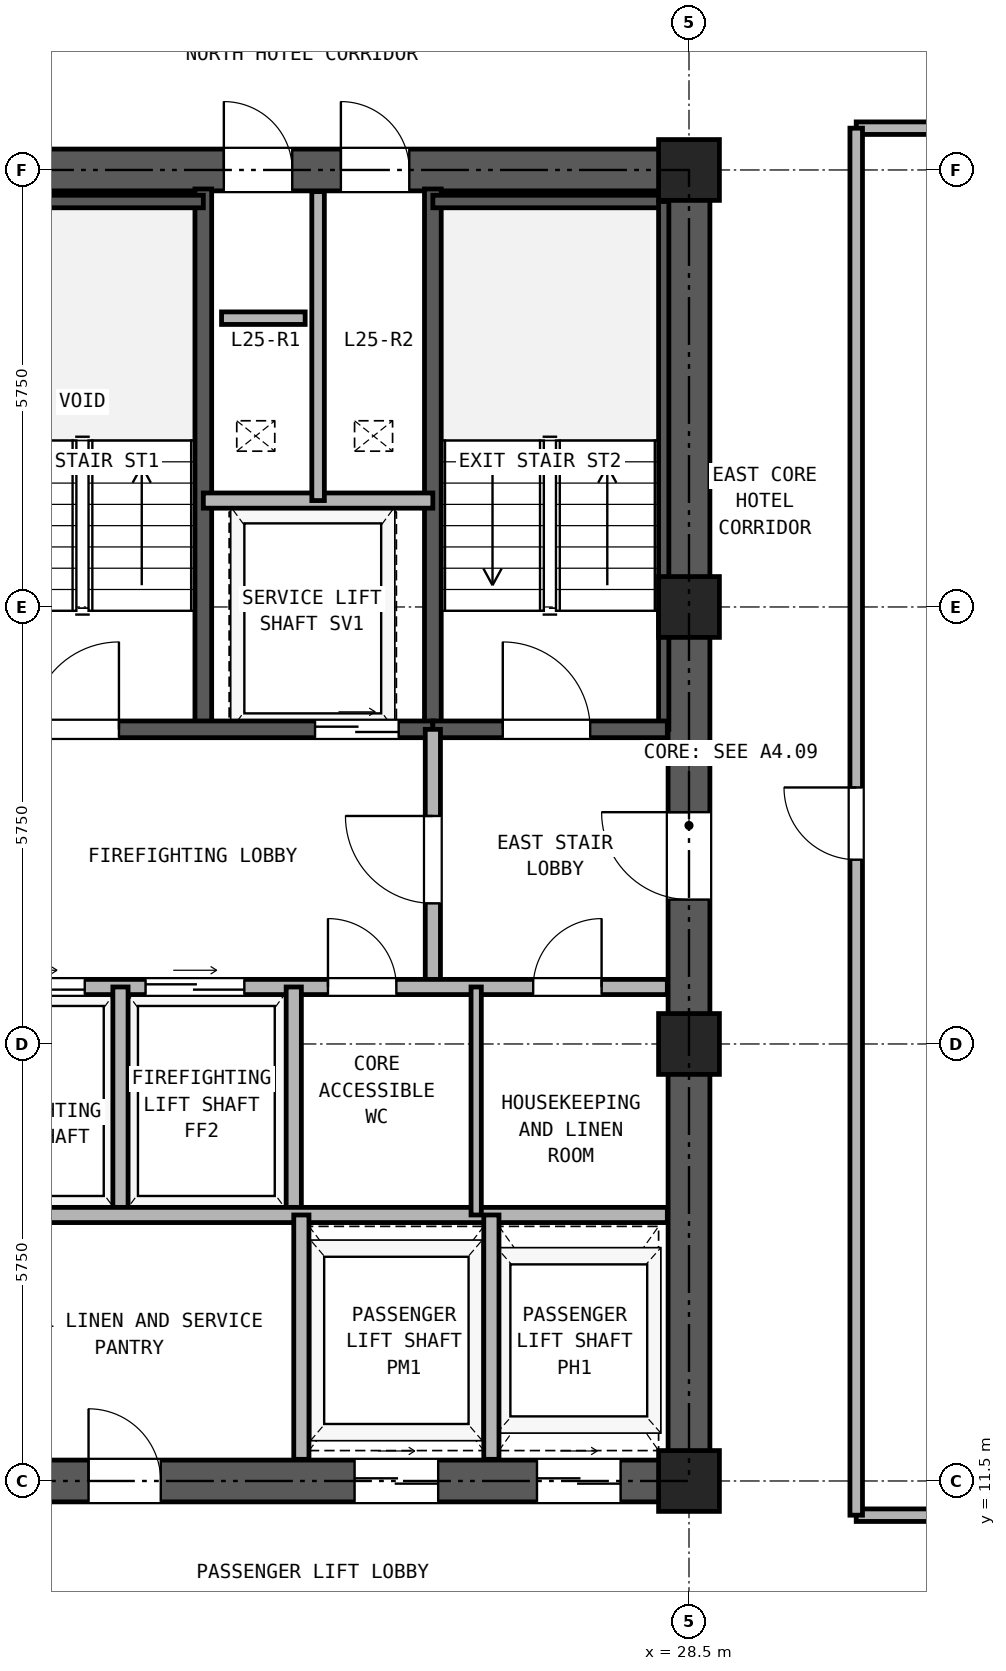
"""IFC4 building model, lengths in metres.
Left out: names, types, materials, properties, quantities, classifications, styles, units other than length and angle.
Written with IfcOpenShell. Run it as: python <this file> out.ifc"""

import sys

from ifc_helpers import new_model, si_unit, direction, frame, frame_2d, origin, origin_2d, place, context, subcontext, project, spatial, rectangle, hollow_rectangle, extrude, source, transform, mapped, element, fill, save


model = new_model("IFC4")
c1 = context("Model", 3, precision=1e-05, world=origin(), true_north=direction((0.0, 1.0)))
c2 = subcontext(c1, "Body", "Model", "MODEL_VIEW")
j1 = project(units=[si_unit("LENGTHUNIT", "METRE"), si_unit("PLANEANGLEUNIT", "RADIAN")], contexts=[c1])
p1 = place(None, origin())
s1 = spatial("IfcSite", under=j1, at=p1, CompositionType="ELEMENT")
p2 = place(p1, origin())
s2 = spatial("IfcBuilding", under=s1, at=p2, CompositionType="ELEMENT")
p3 = place(p2, frame((0.0, 0.0, 95.9)))
s3 = spatial("IfcBuildingStorey", under=s2, at=p3, CompositionType="ELEMENT", Elevation=95.9)
m1 = source(origin(), c2, "Body", "SweptSolid", [
    extrude(hollow_rectangle(XDim=0.8, YDim=0.8, WallThickness=0.045, at=origin_2d()), origin(), (0.0, 0.0, 1.0), 2.95),
])
for number, where, z_axis, x_axis in (
    (1, (28.5, 11.5, 0.0), (0.0, 0.0, 1.0), (1.0, 0.0, 0.0)),
    (2, (28.5, 17.25, 0.0), (0.0, 0.0, 1.0), (1.0, 0.0, 0.0)),
    (3, (28.5, 23.0, 0.0), (0.0, 0.0, 1.0), (1.0, 0.0, 0.0)),
    (4, (28.5, 28.75, 0.0), (0.0, 0.0, 1.0), (1.0, 0.0, 0.0)),
):
    element("IfcColumn", number, at=place(p3, frame(where, z_axis=z_axis, x_axis=x_axis)), inside=s3, PredefinedType="COLUMN", context=c2, shape_type="MappedRepresentation", body=[
        mapped(m1, transform((0.0, 0.0, 0.0), x_axis=(1.0, 0.0, 0.0), y_axis=(0.0, 1.0, 0.0), z_axis=(0.0, 0.0, 1.0), scale=1.0)),
    ])
p4 = place(p3, frame((18.225, 11.5, 0.0), z_axis=(0.0, 0.0, 1.0), x_axis=(1.0, 0.0, 0.0)))
e5 = element("IfcWall", 5, at=p4, inside=s3, PredefinedType="SHEAR", context=c2, shape_type="SweptSolid", body=[
    extrude(rectangle(XDim=10.55, YDim=0.55, at=frame_2d((5.275, 0.0))), origin(), (0.0, 0.0, 1.0), 2.95),
])
p5 = place(p4, frame((2.375, 0.0, 0.0)))
e6 = element("IfcOpeningElement", 6, at=p5, cuts=e5, PredefinedType="OPENING", context=c2, shape_type="SweptSolid", body=[
    extrude(rectangle(XDim=0.95, YDim=2.15, at=frame_2d((0.475, 1.075))), frame((0.0, 0.285, 0.0), z_axis=(0.0, -1.0, 0.0), x_axis=(1.0, 0.0, 0.0)), (0.0, 0.0, 1.0), 0.57),
])
p6 = place(p4, frame((5.875, 0.0, 0.0)))
e7 = element("IfcOpeningElement", 7, at=p6, cuts=e5, PredefinedType="OPENING", context=c2, shape_type="SweptSolid", body=[
    extrude(rectangle(XDim=1.1, YDim=2.25, at=frame_2d((0.55, 1.125))), frame((0.0, 0.285, 0.0), z_axis=(0.0, -1.0, 0.0), x_axis=(1.0, 0.0, 0.0)), (0.0, 0.0, 1.0), 0.57),
])
p7 = place(p4, frame((8.275, 0.0, 0.0)))
e8 = element("IfcOpeningElement", 8, at=p7, cuts=e5, PredefinedType="OPENING", context=c2, shape_type="SweptSolid", body=[
    extrude(rectangle(XDim=1.1, YDim=2.25, at=frame_2d((0.55, 1.125))), frame((0.0, 0.285, 0.0), z_axis=(0.0, -1.0, 0.0), x_axis=(1.0, 0.0, 0.0)), (0.0, 0.0, 1.0), 0.57),
])
p8 = place(p3, frame((18.225, 28.75, 0.0), z_axis=(0.0, 0.0, 1.0), x_axis=(1.0, 0.0, 0.0)))
e9 = element("IfcWall", 9, at=p8, inside=s3, PredefinedType="SHEAR", context=c2, shape_type="SweptSolid", body=[
    extrude(rectangle(XDim=10.55, YDim=0.55, at=frame_2d((5.275, 0.0))), origin(), (0.0, 0.0, 1.0), 2.95),
])
p9 = place(p8, frame((4.155, 0.0, 0.0)))
e10 = element("IfcOpeningElement", 10, at=p9, cuts=e9, PredefinedType="OPENING", context=c2, shape_type="SweptSolid", body=[
    extrude(rectangle(XDim=0.9, YDim=2.05, at=frame_2d((0.45, 1.025))), frame((0.0, 0.285, 0.0), z_axis=(0.0, -1.0, 0.0), x_axis=(1.0, 0.0, 0.0)), (0.0, 0.0, 1.0), 0.57),
])
p10 = place(p8, frame((5.695, 0.0, 0.0)))
e11 = element("IfcOpeningElement", 11, at=p10, cuts=e9, PredefinedType="OPENING", context=c2, shape_type="SweptSolid", body=[
    extrude(rectangle(XDim=0.9, YDim=2.05, at=frame_2d((0.45, 1.025))), frame((0.0, 0.285, 0.0), z_axis=(0.0, -1.0, 0.0), x_axis=(1.0, 0.0, 0.0)), (0.0, 0.0, 1.0), 0.57),
])
p11 = place(p3, frame((28.5, 11.775, 0.0), z_axis=(0.0, 0.0, 1.0), x_axis=(0.0, 1.0, 0.0)))
e12 = element("IfcWall", 12, at=p11, inside=s3, PredefinedType="SHEAR", context=c2, shape_type="SweptSolid", body=[
    extrude(rectangle(XDim=16.7, YDim=0.55, at=frame_2d((8.35, 0.0))), origin(), (0.0, 0.0, 1.0), 2.95),
])
p12 = place(p11, frame((7.375, 0.0, 0.0)))
e13 = element("IfcOpeningElement", 13, at=p12, cuts=e12, PredefinedType="OPENING", context=c2, shape_type="SweptSolid", body=[
    extrude(rectangle(XDim=1.15, YDim=2.2, at=frame_2d((0.575, 1.1))), frame((0.0, 0.285, 0.0), z_axis=(0.0, -1.0, 0.0), x_axis=(1.0, 0.0, 0.0)), (0.0, 0.0, 1.0), 0.57),
])
for number, where, z_axis, x_axis in (
    (14, (22.11, 21.39, 0.0), (0.0, 0.0, 1.0), (0.0, 1.0, 0.0)),
    (15, (25.13, 21.39, 0.0), (0.0, 0.0, 1.0), (0.0, 1.0, 0.0)),
):
    element("IfcWall", number, at=place(p3, frame(where, z_axis=z_axis, x_axis=x_axis)), inside=s3, PredefinedType="SOLIDWALL", context=c2, shape_type="SweptSolid", body=[
        extrude(rectangle(XDim=7.11, YDim=0.22, at=frame_2d((3.555, 0.0))), origin(), (0.0, 0.0, 1.0), 2.95),
    ])
p13 = place(p3, frame((18.785, 28.335, 0.0), z_axis=(0.0, 0.0, 1.0), x_axis=(1.0, 0.0, 0.0)))
e16 = element("IfcWall", 16, at=p13, inside=s3, PredefinedType="PARTITIONING", context=c2, shape_type="SweptSolid", body=[
    extrude(rectangle(XDim=3.325, YDim=0.165, at=frame_2d((1.663, 0.0))), origin(), (0.0, 0.0, 1.0), 2.95),
])
p14 = place(p3, frame((25.13, 28.335, 0.0), z_axis=(0.0, 0.0, 1.0), x_axis=(1.0, 0.0, 0.0)))
e17 = element("IfcWall", 17, at=p14, inside=s3, PredefinedType="PARTITIONING", context=c2, shape_type="SweptSolid", body=[
    extrude(rectangle(XDim=3.085, YDim=0.165, at=frame_2d((1.542, 0.0))), origin(), (0.0, 0.0, 1.0), 2.95),
])
p15 = place(p3, frame((28.167, 21.39, 0.0), z_axis=(0.0, 0.0, 1.0), x_axis=(0.0, 1.0, 0.0)))
e18 = element("IfcWall", 18, at=p15, inside=s3, PredefinedType="PARTITIONING", context=c2, shape_type="SweptSolid", body=[
    extrude(rectangle(XDim=6.945, YDim=0.135, at=frame_2d((3.473, 0.0))), origin(), (0.0, 0.0, 1.0), 2.95),
])
p16 = place(p3, frame((18.785, 21.39, 0.0), z_axis=(0.0, 0.0, 1.0), x_axis=(1.0, 0.0, 0.0)))
e19 = element("IfcWall", 19, at=p16, inside=s3, PredefinedType="SOLIDWALL", context=c2, shape_type="SweptSolid", body=[
    extrude(rectangle(XDim=6.345, YDim=0.22, at=frame_2d((3.172, 0.0))), origin(), (0.0, 0.0, 1.0), 2.95),
])
p17 = place(p16, frame((1.065, 0.0, 0.0)))
e20 = element("IfcOpeningElement", 20, at=p17, cuts=e19, PredefinedType="OPENING", context=c2, shape_type="SweptSolid", body=[
    extrude(rectangle(XDim=1.15, YDim=2.2, at=frame_2d((0.575, 1.1))), frame((0.0, 0.12, 0.0), z_axis=(0.0, -1.0, 0.0), x_axis=(1.0, 0.0, 0.0)), (0.0, 0.0, 1.0), 0.24),
])
p18 = place(p16, frame((4.795, 0.0, 0.0)))
e21 = element("IfcOpeningElement", 21, at=p18, cuts=e19, PredefinedType="OPENING", context=c2, shape_type="SweptSolid", body=[
    extrude(rectangle(XDim=1.1, YDim=2.25, at=frame_2d((0.55, 1.125))), frame((0.0, 0.12, 0.0), z_axis=(0.0, -1.0, 0.0), x_axis=(1.0, 0.0, 0.0)), (0.0, 0.0, 1.0), 0.24),
])
p19 = place(p3, frame((25.13, 21.39, 0.0), z_axis=(0.0, 0.0, 1.0), x_axis=(1.0, 0.0, 0.0)))
e22 = element("IfcWall", 22, at=p19, inside=s3, PredefinedType="SOLIDWALL", context=c2, shape_type="SweptSolid", body=[
    extrude(rectangle(XDim=3.085, YDim=0.22, at=frame_2d((1.542, 0.0))), origin(), (0.0, 0.0, 1.0), 2.95),
])
p20 = place(p19, frame((0.92, 0.0, 0.0)))
e23 = element("IfcOpeningElement", 23, at=p20, cuts=e22, PredefinedType="OPENING", context=c2, shape_type="SweptSolid", body=[
    extrude(rectangle(XDim=1.15, YDim=2.2, at=frame_2d((0.575, 1.1))), frame((0.0, 0.12, 0.0), z_axis=(0.0, -1.0, 0.0), x_axis=(1.0, 0.0, 0.0)), (0.0, 0.0, 1.0), 0.24),
])
p21 = place(p3, frame((22.11, 24.4, 0.0), z_axis=(0.0, 0.0, 1.0), x_axis=(1.0, 0.0, 0.0)))
e24 = element("IfcWall", 24, at=p21, inside=s3, PredefinedType="PARTITIONING", context=c2, shape_type="SweptSolid", body=[
    extrude(rectangle(XDim=3.02, YDim=0.2, at=frame_2d((1.51, 0.0))), origin(), (0.0, 0.0, 1.0), 2.95),
])
p22 = place(p3, frame((23.62, 24.4, 0.0), z_axis=(0.0, 0.0, 1.0), x_axis=(0.0, 1.0, 0.0)))
e25 = element("IfcWall", 25, at=p22, inside=s3, PredefinedType="PARTITIONING", context=c2, shape_type="SweptSolid", body=[
    extrude(rectangle(XDim=4.065, YDim=0.165, at=frame_2d((2.033, 0.0))), origin(), (0.0, 0.0, 1.0), 2.95),
])
p23 = place(p3, frame((25.13, 18.0, 0.0), z_axis=(0.0, 0.0, 1.0), x_axis=(0.0, 1.0, 0.0)))
e26 = element("IfcWall", 26, at=p23, inside=s3, PredefinedType="PARTITIONING", context=c2, shape_type="SweptSolid", body=[
    extrude(rectangle(XDim=3.39, YDim=0.2, at=frame_2d((1.695, 0.0))), origin(), (0.0, 0.0, 1.0), 2.95),
])
p24 = place(p23, frame((1.1, 0.0, 0.0)))
e27 = element("IfcOpeningElement", 27, at=p24, cuts=e26, PredefinedType="OPENING", context=c2, shape_type="SweptSolid", body=[
    extrude(rectangle(XDim=1.15, YDim=2.2, at=frame_2d((0.575, 1.1))), frame((0.0, 0.11, 0.0), z_axis=(0.0, -1.0, 0.0), x_axis=(1.0, 0.0, 0.0)), (0.0, 0.0, 1.0), 0.22),
])
p25 = place(p3, frame((18.785, 18.0, 0.0), z_axis=(0.0, 0.0, 1.0), x_axis=(1.0, 0.0, 0.0)))
e28 = element("IfcWall", 28, at=p25, inside=s3, PredefinedType="PARTITIONING", context=c2, shape_type="SweptSolid", body=[
    extrude(rectangle(XDim=9.43, YDim=0.2, at=frame_2d((4.715, 0.0))), origin(), (0.0, 0.0, 1.0), 2.95),
])
p26 = place(p25, frame((0.465, 0.0, 0.0)))
e29 = element("IfcOpeningElement", 29, at=p26, cuts=e28, PredefinedType="OPENING", context=c2, shape_type="SweptSolid", body=[
    extrude(rectangle(XDim=1.3, YDim=2.3, at=frame_2d((0.65, 1.15))), frame((0.0, 0.11, 0.0), z_axis=(0.0, -1.0, 0.0), x_axis=(1.0, 0.0, 0.0)), (0.0, 0.0, 1.0), 0.22),
])
p27 = place(p25, frame((2.565, 0.0, 0.0)))
e30 = element("IfcOpeningElement", 30, at=p27, cuts=e28, PredefinedType="OPENING", context=c2, shape_type="SweptSolid", body=[
    extrude(rectangle(XDim=1.3, YDim=2.3, at=frame_2d((0.65, 1.15))), frame((0.0, 0.11, 0.0), z_axis=(0.0, -1.0, 0.0), x_axis=(1.0, 0.0, 0.0)), (0.0, 0.0, 1.0), 0.22),
])
p28 = place(p25, frame((4.965, 0.0, 0.0)))
e31 = element("IfcOpeningElement", 31, at=p28, cuts=e28, PredefinedType="OPENING", context=c2, shape_type="SweptSolid", body=[
    extrude(rectangle(XDim=0.9, YDim=2.05, at=frame_2d((0.45, 1.025))), frame((0.0, 0.11, 0.0), z_axis=(0.0, -1.0, 0.0), x_axis=(1.0, 0.0, 0.0)), (0.0, 0.0, 1.0), 0.22),
])
p29 = place(p25, frame((7.665, 0.0, 0.0)))
e32 = element("IfcOpeningElement", 32, at=p29, cuts=e28, PredefinedType="OPENING", context=c2, shape_type="SweptSolid", body=[
    extrude(rectangle(XDim=0.9, YDim=2.05, at=frame_2d((0.45, 1.025))), frame((0.0, 0.11, 0.0), z_axis=(0.0, -1.0, 0.0), x_axis=(1.0, 0.0, 0.0)), (0.0, 0.0, 1.0), 0.22),
])
for number, where, z_axis, x_axis in (
    (33, (21.02, 15.0, 0.0), (0.0, 0.0, 1.0), (0.0, 1.0, 0.0)),
    (34, (23.3, 15.0, 0.0), (0.0, 0.0, 1.0), (0.0, 1.0, 0.0)),
):
    element("IfcWall", number, at=place(p3, frame(where, z_axis=z_axis, x_axis=x_axis)), inside=s3, PredefinedType="PARTITIONING", context=c2, shape_type="SweptSolid", body=[
        extrude(rectangle(XDim=3.0, YDim=0.2, at=frame_2d((1.5, 0.0))), origin(), (0.0, 0.0, 1.0), 2.95),
    ])
p30 = place(p3, frame((18.785, 15.0, 0.0), z_axis=(0.0, 0.0, 1.0), x_axis=(1.0, 0.0, 0.0)))
e35 = element("IfcWall", 35, at=p30, inside=s3, PredefinedType="PARTITIONING", context=c2, shape_type="SweptSolid", body=[
    extrude(rectangle(XDim=9.43, YDim=0.2, at=frame_2d((4.715, 0.0))), origin(), (0.0, 0.0, 1.0), 2.95),
])
p31 = place(p3, frame((25.7, 15.0, 0.0), z_axis=(0.0, 0.0, 1.0), x_axis=(0.0, 1.0, 0.0)))
e36 = element("IfcWall", 36, at=p31, inside=s3, PredefinedType="PARTITIONING", context=c2, shape_type="SweptSolid", body=[
    extrude(rectangle(XDim=3.0, YDim=0.135, at=frame_2d((1.5, 0.0))), origin(), (0.0, 0.0, 1.0), 2.95),
])
for number, where, z_axis, x_axis in (
    (37, (23.4, 11.785, 0.0), (0.0, 0.0, 1.0), (0.0, 1.0, 0.0)),
    (38, (25.9, 11.785, 0.0), (0.0, 0.0, 1.0), (0.0, 1.0, 0.0)),
):
    element("IfcWall", number, at=place(p3, frame(where, z_axis=z_axis, x_axis=x_axis)), inside=s3, PredefinedType="PARTITIONING", context=c2, shape_type="SweptSolid", body=[
        extrude(rectangle(XDim=3.215, YDim=0.2, at=frame_2d((1.607, 0.0))), origin(), (0.0, 0.0, 1.0), 2.95),
    ])
for number, where, z_axis, x_axis in (
    (39, (30.7, 11.05, 0.0), (0.0, 0.0, 1.0), (1.0, 0.0, 0.0)),
    (40, (30.7, 29.3, 0.0), (0.0, 0.0, 1.0), (1.0, 0.0, 0.0)),
):
    element("IfcWall", number, at=place(p3, frame(where, z_axis=z_axis, x_axis=x_axis)), inside=s3, PredefinedType="PARTITIONING", context=c2, shape_type="SweptSolid", body=[
        extrude(rectangle(XDim=9.5, YDim=0.165, at=frame_2d((4.75, 0.0))), origin(), (0.0, 0.0, 1.0), 2.95),
    ])
p32 = place(p3, frame((30.7, 11.05, 0.0), z_axis=(0.0, 0.0, 1.0), x_axis=(0.0, 1.0, 0.0)))
e41 = element("IfcWall", 41, at=p32, inside=s3, PredefinedType="PARTITIONING", context=c2, shape_type="SweptSolid", body=[
    extrude(rectangle(XDim=18.25, YDim=0.165, at=frame_2d((9.125, 0.0))), origin(), (0.0, 0.0, 1.0), 2.95),
])
p33 = place(p32, frame((8.625, 0.0, 0.0)))
e42 = element("IfcOpeningElement", 42, at=p33, cuts=e41, PredefinedType="OPENING", context=c2, shape_type="SweptSolid", body=[
    extrude(rectangle(XDim=0.95, YDim=2.15, at=frame_2d((0.475, 1.075))), frame((0.0, 0.093, 0.0), z_axis=(0.0, -1.0, 0.0), x_axis=(1.0, 0.0, 0.0)), (0.0, 0.0, 1.0), 0.185),
])
p34 = place(p3, frame((22.35, 26.8, 0.0), z_axis=(0.0, 0.0, 1.0), x_axis=(1.0, 0.0, 0.0)))
e43 = element("IfcWall", 43, at=p34, inside=s3, PredefinedType="PARTITIONING", context=c2, shape_type="SweptSolid", body=[
    extrude(rectangle(XDim=1.1, YDim=0.165, at=frame_2d((0.55, 0.0))), origin(), (0.0, 0.0, 1.0), 2.95),
])
p35 = place(p17, frame((1.15, 0.0, 0.0), z_axis=(0.0, 0.0, 1.0), x_axis=(-1.0, 0.0, 0.0)))
e44 = element("IfcDoor", 44, at=p35, inside=s3, OperationType="SINGLE_SWING_RIGHT", PredefinedType="DOOR", context=c2, shape_type="SweptSolid", body=[
    extrude(rectangle(XDim=1.15, YDim=2.2, at=frame_2d((0.575, 1.1))), frame((0.0, 0.025, 0.0), z_axis=(0.0, -1.0, 0.0), x_axis=(1.0, 0.0, 0.0)), (0.0, 0.0, 1.0), 0.05),
])
fill(e20, e44)
p36 = place(p20, frame((1.15, 0.0, 0.0), z_axis=(0.0, 0.0, 1.0), x_axis=(-1.0, 0.0, 0.0)))
e45 = element("IfcDoor", 45, at=p36, inside=s3, OperationType="SINGLE_SWING_LEFT", PredefinedType="DOOR", context=c2, shape_type="SweptSolid", body=[
    extrude(rectangle(XDim=1.15, YDim=2.2, at=frame_2d((0.575, 1.1))), frame((0.0, 0.025, 0.0), z_axis=(0.0, -1.0, 0.0), x_axis=(1.0, 0.0, 0.0)), (0.0, 0.0, 1.0), 0.05),
])
fill(e23, e45)
p37 = place(p18, frame((1.1, 0.0, 0.0), z_axis=(0.0, 0.0, 1.0), x_axis=(-1.0, 0.0, 0.0)))
e46 = element("IfcDoor", 46, at=p37, inside=s3, OperationType="DOUBLE_DOOR_SLIDING", PredefinedType="DOOR", context=c2, shape_type="SweptSolid", body=[
    extrude(rectangle(XDim=1.1, YDim=2.25, at=frame_2d((0.55, 1.125))), frame((0.0, 0.025, 0.0), z_axis=(0.0, -1.0, 0.0), x_axis=(1.0, 0.0, 0.0)), (0.0, 0.0, 1.0), 0.05),
])
fill(e21, e46)
p38 = place(p24, origin())
e47 = element("IfcDoor", 47, at=p38, inside=s3, OperationType="SINGLE_SWING_RIGHT", PredefinedType="DOOR", context=c2, shape_type="SweptSolid", body=[
    extrude(rectangle(XDim=1.15, YDim=2.2, at=frame_2d((0.575, 1.1))), frame((0.0, 0.025, 0.0), z_axis=(0.0, -1.0, 0.0), x_axis=(1.0, 0.0, 0.0)), (0.0, 0.0, 1.0), 0.05),
])
fill(e27, e47)
p39 = place(p26, origin())
e48 = element("IfcDoor", 48, at=p39, inside=s3, OperationType="DOUBLE_DOOR_SLIDING", PredefinedType="DOOR", context=c2, shape_type="SweptSolid", body=[
    extrude(rectangle(XDim=1.3, YDim=2.3, at=frame_2d((0.65, 1.15))), frame((0.0, 0.025, 0.0), z_axis=(0.0, -1.0, 0.0), x_axis=(1.0, 0.0, 0.0)), (0.0, 0.0, 1.0), 0.05),
])
fill(e29, e48)
p40 = place(p27, origin())
e49 = element("IfcDoor", 49, at=p40, inside=s3, OperationType="DOUBLE_DOOR_SLIDING", PredefinedType="DOOR", context=c2, shape_type="SweptSolid", body=[
    extrude(rectangle(XDim=1.3, YDim=2.3, at=frame_2d((0.65, 1.15))), frame((0.0, 0.025, 0.0), z_axis=(0.0, -1.0, 0.0), x_axis=(1.0, 0.0, 0.0)), (0.0, 0.0, 1.0), 0.05),
])
fill(e30, e49)
p41 = place(p28, frame((0.9, 0.0, 0.0), z_axis=(0.0, 0.0, 1.0), x_axis=(-1.0, 0.0, 0.0)))
e50 = element("IfcDoor", 50, at=p41, inside=s3, OperationType="SINGLE_SWING_LEFT", PredefinedType="DOOR", context=c2, shape_type="SweptSolid", body=[
    extrude(rectangle(XDim=0.9, YDim=2.05, at=frame_2d((0.45, 1.025))), frame((0.0, 0.025, 0.0), z_axis=(0.0, -1.0, 0.0), x_axis=(1.0, 0.0, 0.0)), (0.0, 0.0, 1.0), 0.05),
])
fill(e31, e50)
p42 = place(p29, frame((0.9, 0.0, 0.0), z_axis=(0.0, 0.0, 1.0), x_axis=(-1.0, 0.0, 0.0)))
e51 = element("IfcDoor", 51, at=p42, inside=s3, OperationType="SINGLE_SWING_RIGHT", PredefinedType="DOOR", context=c2, shape_type="SweptSolid", body=[
    extrude(rectangle(XDim=0.9, YDim=2.05, at=frame_2d((0.45, 1.025))), frame((0.0, 0.025, 0.0), z_axis=(0.0, -1.0, 0.0), x_axis=(1.0, 0.0, 0.0)), (0.0, 0.0, 1.0), 0.05),
])
fill(e32, e51)
p43 = place(p12, origin())
e52 = element("IfcDoor", 52, at=p43, inside=s3, OperationType="SINGLE_SWING_RIGHT", PredefinedType="DOOR", context=c2, shape_type="SweptSolid", body=[
    extrude(rectangle(XDim=1.15, YDim=2.2, at=frame_2d((0.575, 1.1))), frame((0.0, 0.025, 0.0), z_axis=(0.0, -1.0, 0.0), x_axis=(1.0, 0.0, 0.0)), (0.0, 0.0, 1.0), 0.05),
])
fill(e13, e52)
p44 = place(p9, origin())
e53 = element("IfcDoor", 53, at=p44, inside=s3, OperationType="SINGLE_SWING_LEFT", PredefinedType="DOOR", context=c2, shape_type="SweptSolid", body=[
    extrude(rectangle(XDim=0.9, YDim=2.05, at=frame_2d((0.45, 1.025))), frame((0.0, 0.025, 0.0), z_axis=(0.0, -1.0, 0.0), x_axis=(1.0, 0.0, 0.0)), (0.0, 0.0, 1.0), 0.05),
])
fill(e10, e53)
p45 = place(p10, origin())
e54 = element("IfcDoor", 54, at=p45, inside=s3, OperationType="SINGLE_SWING_LEFT", PredefinedType="DOOR", context=c2, shape_type="SweptSolid", body=[
    extrude(rectangle(XDim=0.9, YDim=2.05, at=frame_2d((0.45, 1.025))), frame((0.0, 0.025, 0.0), z_axis=(0.0, -1.0, 0.0), x_axis=(1.0, 0.0, 0.0)), (0.0, 0.0, 1.0), 0.05),
])
fill(e11, e54)
p46 = place(p5, frame((0.95, 0.0, 0.0), z_axis=(0.0, 0.0, 1.0), x_axis=(-1.0, 0.0, 0.0)))
e55 = element("IfcDoor", 55, at=p46, inside=s3, OperationType="SINGLE_SWING_LEFT", PredefinedType="DOOR", context=c2, shape_type="SweptSolid", body=[
    extrude(rectangle(XDim=0.95, YDim=2.15, at=frame_2d((0.475, 1.075))), frame((0.0, 0.025, 0.0), z_axis=(0.0, -1.0, 0.0), x_axis=(1.0, 0.0, 0.0)), (0.0, 0.0, 1.0), 0.05),
])
fill(e6, e55)
p47 = place(p6, frame((1.1, 0.0, 0.0), z_axis=(0.0, 0.0, 1.0), x_axis=(-1.0, 0.0, 0.0)))
e56 = element("IfcDoor", 56, at=p47, inside=s3, OperationType="DOUBLE_DOOR_SLIDING", PredefinedType="DOOR", context=c2, shape_type="SweptSolid", body=[
    extrude(rectangle(XDim=1.1, YDim=2.25, at=frame_2d((0.55, 1.125))), frame((0.0, 0.025, 0.0), z_axis=(0.0, -1.0, 0.0), x_axis=(1.0, 0.0, 0.0)), (0.0, 0.0, 1.0), 0.05),
])
fill(e7, e56)
p48 = place(p7, frame((1.1, 0.0, 0.0), z_axis=(0.0, 0.0, 1.0), x_axis=(-1.0, 0.0, 0.0)))
e57 = element("IfcDoor", 57, at=p48, inside=s3, OperationType="DOUBLE_DOOR_SLIDING", PredefinedType="DOOR", context=c2, shape_type="SweptSolid", body=[
    extrude(rectangle(XDim=1.1, YDim=2.25, at=frame_2d((0.55, 1.125))), frame((0.0, 0.025, 0.0), z_axis=(0.0, -1.0, 0.0), x_axis=(1.0, 0.0, 0.0)), (0.0, 0.0, 1.0), 0.05),
])
fill(e8, e57)
p49 = place(p33, origin())
e58 = element("IfcDoor", 58, at=p49, inside=s3, OperationType="SINGLE_SWING_RIGHT", PredefinedType="DOOR", context=c2, shape_type="SweptSolid", body=[
    extrude(rectangle(XDim=0.95, YDim=2.15, at=frame_2d((0.475, 1.075))), frame((0.0, 0.025, 0.0), z_axis=(0.0, -1.0, 0.0), x_axis=(1.0, 0.0, 0.0)), (0.0, 0.0, 1.0), 0.05),
])
fill(e42, e58)
save(model, sys.argv[1])
